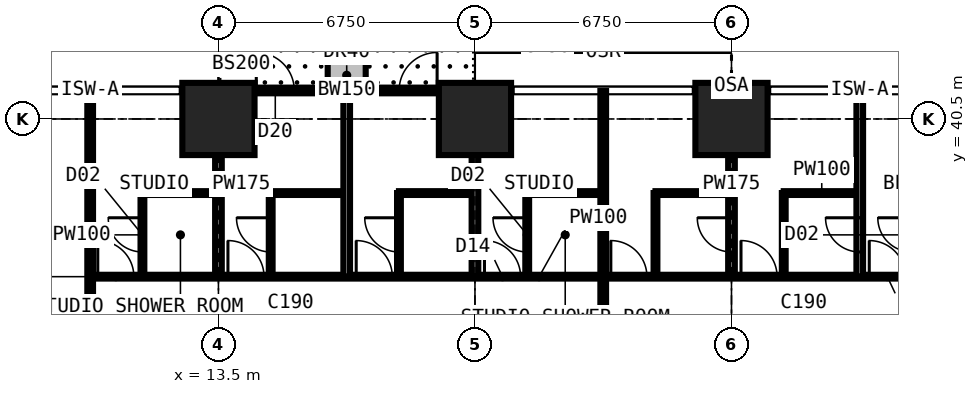
"""IFC4 building model, lengths in metres.
Left out: names, types, materials, properties, quantities, classifications, styles, units other than length and angle.
Written with IfcOpenShell. Run it as: python <this file> out.ifc"""

import sys

from ifc_helpers import new_model, si_unit, direction, frame, frame_2d, origin, origin_2d, place, context, subcontext, project, spatial, rectangle, extrude, element, fill, save


model = new_model("IFC4")
c1 = context("Model", 3, precision=1e-05, world=origin(), true_north=direction((0.0, 1.0)))
c2 = subcontext(c1, "Body", "Model", "MODEL_VIEW")
j1 = project(units=[si_unit("LENGTHUNIT", "METRE"), si_unit("PLANEANGLEUNIT", "RADIAN")], contexts=[c1])
p1 = place(None, origin())
s1 = spatial("IfcSite", under=j1, at=p1, CompositionType="ELEMENT")
p2 = place(p1, origin())
s2 = spatial("IfcBuilding", under=s1, at=p2, CompositionType="ELEMENT")
p3 = place(p2, frame((0.0, 0.0, 32.4)))
s3 = spatial("IfcBuildingStorey", under=s2, at=p3, CompositionType="ELEMENT", Elevation=32.4)
for number, where, z_axis, x_axis in (
    (1, (13.5, 40.5, 0.0), (0.0, 0.0, 1.0), (1.0, 0.0, 0.0)),
    (2, (20.25, 40.5, 0.0), (0.0, 0.0, 1.0), (1.0, 0.0, 0.0)),
    (3, (27.0, 40.5, 0.0), (0.0, 0.0, 1.0), (1.0, 0.0, 0.0)),
):
    element("IfcColumn", number, at=place(p3, frame(where, z_axis=z_axis, x_axis=x_axis)), inside=s3, PredefinedType="COLUMN", context=c2, shape_type="SweptSolid", body=[
        extrude(rectangle(XDim=1.9, YDim=1.9, at=origin_2d()), origin(), (0.0, 0.0, 1.0), 3.6),
    ])
p4 = place(p3, frame((13.5, 41.25, 0.0), z_axis=(0.0, 0.0, 1.0), x_axis=(1.0, 0.0, 0.0)))
e4 = element("IfcWall", 4, at=p4, inside=s3, PredefinedType="SOLIDWALL", context=c2, shape_type="SweptSolid", body=[
    extrude(rectangle(XDim=6.75, YDim=0.15, at=frame_2d((3.375, 0.0))), origin(), (0.0, 0.0, 1.0), 3.375),
])
p5 = place(p4, frame((0.996, 0.0, 0.0)))
e5 = element("IfcOpeningElement", 5, at=p5, cuts=e4, PredefinedType="OPENING", context=c2, shape_type="SweptSolid", body=[
    extrude(rectangle(XDim=1.0, YDim=2.2, at=frame_2d((0.5, 1.1))), frame((0.0, 0.085, 0.0), z_axis=(0.0, -1.0, 0.0), x_axis=(1.0, 0.0, 0.0)), (0.0, 0.0, 1.0), 0.17),
])
p6 = place(p4, frame((2.042, 0.0, 0.9)))
e6 = element("IfcOpeningElement", 6, at=p6, cuts=e4, PredefinedType="OPENING", context=c2, shape_type="SweptSolid", body=[
    extrude(rectangle(XDim=1.2, YDim=1.8, at=frame_2d((0.6, 0.9))), frame((0.0, 0.085, 0.0), z_axis=(0.0, -1.0, 0.0), x_axis=(1.0, 0.0, 0.0)), (0.0, 0.0, 1.0), 0.17),
])
p7 = place(p4, frame((4.754, 0.0, 0.0)))
e7 = element("IfcOpeningElement", 7, at=p7, cuts=e4, PredefinedType="OPENING", context=c2, shape_type="SweptSolid", body=[
    extrude(rectangle(XDim=1.0, YDim=2.2, at=frame_2d((0.5, 1.1))), frame((0.0, 0.085, 0.0), z_axis=(0.0, -1.0, 0.0), x_axis=(1.0, 0.0, 0.0)), (0.0, 0.0, 1.0), 0.17),
])
p8 = place(p4, frame((3.508, 0.0, 0.9)))
e8 = element("IfcOpeningElement", 8, at=p8, cuts=e4, PredefinedType="OPENING", context=c2, shape_type="SweptSolid", body=[
    extrude(rectangle(XDim=1.2, YDim=1.8, at=frame_2d((0.6, 0.9))), frame((0.0, 0.085, 0.0), z_axis=(0.0, -1.0, 0.0), x_axis=(1.0, 0.0, 0.0)), (0.0, 0.0, 1.0), 0.17),
])
p9 = place(p3, frame((16.875, 41.35, 0.0), z_axis=(0.0, 0.0, 1.0), x_axis=(0.0, 1.0, 0.0)))
e9 = element("IfcWall", 9, at=p9, inside=s3, PredefinedType="USERDEFINED", context=c2, shape_type="SweptSolid", body=[
    extrude(rectangle(XDim=2.2, YDim=1.0, at=frame_2d((1.1, 0.0))), origin(), (0.0, 0.0, 1.0), 0.9),
])
p10 = place(p3, frame((10.125, 30.375, 0.0), z_axis=(0.0, 0.0, 1.0), x_axis=(0.0, 1.0, 0.0)))
e10 = element("IfcWall", 10, at=p10, inside=s3, PredefinedType="PARTITIONING", context=c2, shape_type="SweptSolid", body=[
    extrude(rectangle(XDim=10.859, YDim=0.15, at=frame_2d((5.429, 0.0))), origin(), (0.0, 0.0, 1.0), 3.375),
])
p11 = place(p3, frame((10.125, 36.35, 0.0), z_axis=(0.0, 0.0, 1.0), x_axis=(1.0, 0.0, 0.0)))
e11 = element("IfcWall", 11, at=p11, inside=s3, PredefinedType="PARTITIONING", context=c2, shape_type="SweptSolid", body=[
    extrude(rectangle(XDim=23.625, YDim=0.1, at=frame_2d((11.812, 0.0))), origin(), (0.0, 0.0, 1.0), 3.375),
])
p12 = place(p11, frame((20.5, 0.0, 0.0)))
e12 = element("IfcOpeningElement", 12, at=p12, cuts=e11, PredefinedType="OPENING", context=c2, shape_type="SweptSolid", body=[
    extrude(rectangle(XDim=0.95, YDim=2.2, at=frame_2d((0.475, 1.1))), frame((0.0, 0.06, 0.0), z_axis=(0.0, -1.0, 0.0), x_axis=(1.0, 0.0, 0.0)), (0.0, 0.0, 1.0), 0.12),
])
p13 = place(p11, frame((17.125, 0.0, 0.0)))
e13 = element("IfcOpeningElement", 13, at=p13, cuts=e11, PredefinedType="OPENING", context=c2, shape_type="SweptSolid", body=[
    extrude(rectangle(XDim=0.95, YDim=2.2, at=frame_2d((0.475, 1.1))), frame((0.0, 0.06, 0.0), z_axis=(0.0, -1.0, 0.0), x_axis=(1.0, 0.0, 0.0)), (0.0, 0.0, 1.0), 0.12),
])
p14 = place(p11, frame((13.7, 0.0, 0.0)))
e14 = element("IfcOpeningElement", 14, at=p14, cuts=e11, PredefinedType="OPENING", context=c2, shape_type="SweptSolid", body=[
    extrude(rectangle(XDim=0.95, YDim=2.2, at=frame_2d((0.475, 1.1))), frame((0.0, 0.06, 0.0), z_axis=(0.0, -1.0, 0.0), x_axis=(1.0, 0.0, 0.0)), (0.0, 0.0, 1.0), 0.12),
])
p15 = place(p11, frame((0.2, 0.0, 0.0)))
e15 = element("IfcOpeningElement", 15, at=p15, cuts=e11, PredefinedType="OPENING", context=c2, shape_type="SweptSolid", body=[
    extrude(rectangle(XDim=0.95, YDim=2.2, at=frame_2d((0.475, 1.1))), frame((0.0, 0.06, 0.0), z_axis=(0.0, -1.0, 0.0), x_axis=(1.0, 0.0, 0.0)), (0.0, 0.0, 1.0), 0.12),
])
p16 = place(p11, frame((3.625, 0.0, 0.0)))
e16 = element("IfcOpeningElement", 16, at=p16, cuts=e11, PredefinedType="OPENING", context=c2, shape_type="SweptSolid", body=[
    extrude(rectangle(XDim=0.95, YDim=2.2, at=frame_2d((0.475, 1.1))), frame((0.0, 0.06, 0.0), z_axis=(0.0, -1.0, 0.0), x_axis=(1.0, 0.0, 0.0)), (0.0, 0.0, 1.0), 0.12),
])
p17 = place(p11, frame((7.0, 0.0, 0.0)))
e17 = element("IfcOpeningElement", 17, at=p17, cuts=e11, PredefinedType="OPENING", context=c2, shape_type="SweptSolid", body=[
    extrude(rectangle(XDim=0.95, YDim=2.2, at=frame_2d((0.475, 1.1))), frame((0.0, 0.06, 0.0), z_axis=(0.0, -1.0, 0.0), x_axis=(1.0, 0.0, 0.0)), (0.0, 0.0, 1.0), 0.12),
])
p18 = place(p11, frame((10.375, 0.0, 0.0)))
e18 = element("IfcOpeningElement", 18, at=p18, cuts=e11, PredefinedType="OPENING", context=c2, shape_type="SweptSolid", body=[
    extrude(rectangle(XDim=0.95, YDim=2.2, at=frame_2d((0.475, 1.1))), frame((0.0, 0.06, 0.0), z_axis=(0.0, -1.0, 0.0), x_axis=(1.0, 0.0, 0.0)), (0.0, 0.0, 1.0), 0.12),
])
p19 = place(p3, frame((11.5, 36.35, 0.0), z_axis=(0.0, 0.0, 1.0), x_axis=(0.0, 1.0, 0.0)))
e19 = element("IfcWall", 19, at=p19, inside=s3, PredefinedType="PARTITIONING", context=c2, shape_type="SweptSolid", body=[
    extrude(rectangle(XDim=2.2, YDim=0.1, at=frame_2d((1.1, 0.0))), origin(), (0.0, 0.0, 1.0), 3.375),
])
p20 = place(p19, frame((0.65, 0.0, 0.0)))
e20 = element("IfcOpeningElement", 20, at=p20, cuts=e19, PredefinedType="OPENING", context=c2, shape_type="SweptSolid", body=[
    extrude(rectangle(XDim=0.9, YDim=2.2, at=frame_2d((0.45, 1.1))), frame((0.0, 0.06, 0.0), z_axis=(0.0, -1.0, 0.0), x_axis=(1.0, 0.0, 0.0)), (0.0, 0.0, 1.0), 0.12),
])
p21 = place(p3, frame((11.5, 38.55, 0.0), z_axis=(0.0, 0.0, 1.0), x_axis=(1.0, 0.0, 0.0)))
e21 = element("IfcWall", 21, at=p21, inside=s3, PredefinedType="PARTITIONING", context=c2, shape_type="SweptSolid", body=[
    extrude(rectangle(XDim=2.0, YDim=0.1, at=frame_2d((1.0, 0.0))), origin(), (0.0, 0.0, 1.0), 3.375),
])
p22 = place(p3, frame((13.5, 36.35, 0.0), z_axis=(0.0, 0.0, 1.0), x_axis=(0.0, 1.0, 0.0)))
e22 = element("IfcWall", 22, at=p22, inside=s3, PredefinedType="PARTITIONING", context=c2, shape_type="SweptSolid", body=[
    extrude(rectangle(XDim=4.884, YDim=0.175, at=frame_2d((2.442, 0.0))), origin(), (0.0, 0.0, 1.0), 2.877),
])
p23 = place(p3, frame((14.875, 36.35, 0.0), z_axis=(0.0, 0.0, 1.0), x_axis=(0.0, 1.0, 0.0)))
e23 = element("IfcWall", 23, at=p23, inside=s3, PredefinedType="PARTITIONING", context=c2, shape_type="SweptSolid", body=[
    extrude(rectangle(XDim=2.2, YDim=0.1, at=frame_2d((1.1, 0.0))), origin(), (0.0, 0.0, 1.0), 3.375),
])
p24 = place(p23, frame((0.65, 0.0, 0.0)))
e24 = element("IfcOpeningElement", 24, at=p24, cuts=e23, PredefinedType="OPENING", context=c2, shape_type="SweptSolid", body=[
    extrude(rectangle(XDim=0.9, YDim=2.2, at=frame_2d((0.45, 1.1))), frame((0.0, 0.06, 0.0), z_axis=(0.0, -1.0, 0.0), x_axis=(1.0, 0.0, 0.0)), (0.0, 0.0, 1.0), 0.12),
])
p25 = place(p3, frame((14.875, 38.55, 0.0), z_axis=(0.0, 0.0, 1.0), x_axis=(1.0, 0.0, 0.0)))
e25 = element("IfcWall", 25, at=p25, inside=s3, PredefinedType="PARTITIONING", context=c2, shape_type="SweptSolid", body=[
    extrude(rectangle(XDim=2.0, YDim=0.1, at=frame_2d((1.0, 0.0))), origin(), (0.0, 0.0, 1.0), 3.375),
])
p26 = place(p3, frame((16.875, 36.35, 0.0), z_axis=(0.0, 0.0, 1.0), x_axis=(0.0, 1.0, 0.0)))
e26 = element("IfcWall", 26, at=p26, inside=s3, PredefinedType="PARTITIONING", context=c2, shape_type="SweptSolid", body=[
    extrude(rectangle(XDim=4.884, YDim=0.175, at=frame_2d((2.442, 0.0))), origin(), (0.0, 0.0, 1.0), 3.375),
])
p27 = place(p3, frame((18.25, 36.35, 0.0), z_axis=(0.0, 0.0, 1.0), x_axis=(0.0, 1.0, 0.0)))
e27 = element("IfcWall", 27, at=p27, inside=s3, PredefinedType="PARTITIONING", context=c2, shape_type="SweptSolid", body=[
    extrude(rectangle(XDim=2.2, YDim=0.1, at=frame_2d((1.1, 0.0))), origin(), (0.0, 0.0, 1.0), 3.375),
])
p28 = place(p27, frame((0.65, 0.0, 0.0)))
e28 = element("IfcOpeningElement", 28, at=p28, cuts=e27, PredefinedType="OPENING", context=c2, shape_type="SweptSolid", body=[
    extrude(rectangle(XDim=0.9, YDim=2.2, at=frame_2d((0.45, 1.1))), frame((0.0, 0.06, 0.0), z_axis=(0.0, -1.0, 0.0), x_axis=(1.0, 0.0, 0.0)), (0.0, 0.0, 1.0), 0.12),
])
p29 = place(p3, frame((18.25, 38.55, 0.0), z_axis=(0.0, 0.0, 1.0), x_axis=(1.0, 0.0, 0.0)))
e29 = element("IfcWall", 29, at=p29, inside=s3, PredefinedType="PARTITIONING", context=c2, shape_type="SweptSolid", body=[
    extrude(rectangle(XDim=2.0, YDim=0.1, at=frame_2d((1.0, 0.0))), origin(), (0.0, 0.0, 1.0), 3.375),
])
p30 = place(p3, frame((20.25, 36.35, 0.0), z_axis=(0.0, 0.0, 1.0), x_axis=(0.0, 1.0, 0.0)))
e30 = element("IfcWall", 30, at=p30, inside=s3, PredefinedType="PARTITIONING", context=c2, shape_type="SweptSolid", body=[
    extrude(rectangle(XDim=4.884, YDim=0.175, at=frame_2d((2.442, 0.0))), origin(), (0.0, 0.0, 1.0), 2.61),
])
p31 = place(p3, frame((21.625, 36.35, 0.0), z_axis=(0.0, 0.0, 1.0), x_axis=(0.0, 1.0, 0.0)))
e31 = element("IfcWall", 31, at=p31, inside=s3, PredefinedType="PARTITIONING", context=c2, shape_type="SweptSolid", body=[
    extrude(rectangle(XDim=2.2, YDim=0.1, at=frame_2d((1.1, 0.0))), origin(), (0.0, 0.0, 1.0), 3.375),
])
p32 = place(p31, frame((0.65, 0.0, 0.0)))
e32 = element("IfcOpeningElement", 32, at=p32, cuts=e31, PredefinedType="OPENING", context=c2, shape_type="SweptSolid", body=[
    extrude(rectangle(XDim=0.9, YDim=2.2, at=frame_2d((0.45, 1.1))), frame((0.0, 0.06, 0.0), z_axis=(0.0, -1.0, 0.0), x_axis=(1.0, 0.0, 0.0)), (0.0, 0.0, 1.0), 0.12),
])
p33 = place(p3, frame((21.625, 38.55, 0.0), z_axis=(0.0, 0.0, 1.0), x_axis=(1.0, 0.0, 0.0)))
e33 = element("IfcWall", 33, at=p33, inside=s3, PredefinedType="PARTITIONING", context=c2, shape_type="SweptSolid", body=[
    extrude(rectangle(XDim=2.0, YDim=0.1, at=frame_2d((1.0, 0.0))), origin(), (0.0, 0.0, 1.0), 3.375),
])
p34 = place(p3, frame((23.625, 29.2, 0.0), z_axis=(0.0, 0.0, 1.0), x_axis=(0.0, 1.0, 0.0)))
e34 = element("IfcWall", 34, at=p34, inside=s3, PredefinedType="PARTITIONING", context=c2, shape_type="SweptSolid", body=[
    extrude(rectangle(XDim=12.034, YDim=0.15, at=frame_2d((6.017, 0.0))), origin(), (0.0, 0.0, 1.0), 3.375),
])
p35 = place(p3, frame((25.0, 36.35, 0.0), z_axis=(0.0, 0.0, 1.0), x_axis=(0.0, 1.0, 0.0)))
e35 = element("IfcWall", 35, at=p35, inside=s3, PredefinedType="PARTITIONING", context=c2, shape_type="SweptSolid", body=[
    extrude(rectangle(XDim=2.2, YDim=0.1, at=frame_2d((1.1, 0.0))), origin(), (0.0, 0.0, 1.0), 3.375),
])
p36 = place(p3, frame((25.0, 38.55, 0.0), z_axis=(0.0, 0.0, 1.0), x_axis=(1.0, 0.0, 0.0)))
e36 = element("IfcWall", 36, at=p36, inside=s3, PredefinedType="PARTITIONING", context=c2, shape_type="SweptSolid", body=[
    extrude(rectangle(XDim=2.0, YDim=0.1, at=frame_2d((1.0, 0.0))), origin(), (0.0, 0.0, 1.0), 3.375),
])
p37 = place(p3, frame((27.0, 36.35, 0.0), z_axis=(0.0, 0.0, 1.0), x_axis=(0.0, 1.0, 0.0)))
e37 = element("IfcWall", 37, at=p37, inside=s3, PredefinedType="PARTITIONING", context=c2, shape_type="SweptSolid", body=[
    extrude(rectangle(XDim=4.884, YDim=0.175, at=frame_2d((2.442, 0.0))), origin(), (0.0, 0.0, 1.0), 2.61),
])
p38 = place(p37, frame((0.65, 0.0, 0.0)))
e38 = element("IfcOpeningElement", 38, at=p38, cuts=e37, PredefinedType="OPENING", context=c2, shape_type="SweptSolid", body=[
    extrude(rectangle(XDim=0.9, YDim=2.2, at=frame_2d((0.45, 1.1))), frame((0.0, 0.097, 0.0), z_axis=(0.0, -1.0, 0.0), x_axis=(1.0, 0.0, 0.0)), (0.0, 0.0, 1.0), 0.195),
])
p39 = place(p3, frame((28.375, 36.35, 0.0), z_axis=(0.0, 0.0, 1.0), x_axis=(0.0, 1.0, 0.0)))
e39 = element("IfcWall", 39, at=p39, inside=s3, PredefinedType="PARTITIONING", context=c2, shape_type="SweptSolid", body=[
    extrude(rectangle(XDim=2.2, YDim=0.1, at=frame_2d((1.1, 0.0))), origin(), (0.0, 0.0, 1.0), 3.375),
])
p40 = place(p3, frame((28.375, 38.55, 0.0), z_axis=(0.0, 0.0, 1.0), x_axis=(1.0, 0.0, 0.0)))
e40 = element("IfcWall", 40, at=p40, inside=s3, PredefinedType="PARTITIONING", context=c2, shape_type="SweptSolid", body=[
    extrude(rectangle(XDim=2.0, YDim=0.1, at=frame_2d((1.0, 0.0))), origin(), (0.0, 0.0, 1.0), 3.375),
])
p41 = place(p3, frame((30.375, 36.35, 0.0), z_axis=(0.0, 0.0, 1.0), x_axis=(0.0, 1.0, 0.0)))
e41 = element("IfcWall", 41, at=p41, inside=s3, PredefinedType="PARTITIONING", context=c2, shape_type="SweptSolid", body=[
    extrude(rectangle(XDim=4.884, YDim=0.175, at=frame_2d((2.442, 0.0))), origin(), (0.0, 0.0, 1.0), 3.375),
])
p42 = place(p41, frame((0.65, 0.0, 0.0)))
e42 = element("IfcOpeningElement", 42, at=p42, cuts=e41, PredefinedType="OPENING", context=c2, shape_type="SweptSolid", body=[
    extrude(rectangle(XDim=0.9, YDim=2.2, at=frame_2d((0.45, 1.1))), frame((0.0, 0.097, 0.0), z_axis=(0.0, -1.0, 0.0), x_axis=(1.0, 0.0, 0.0)), (0.0, 0.0, 1.0), 0.195),
])
p43 = place(p5, origin())
e43 = element("IfcDoor", 43, at=p43, inside=s3, OperationType="SINGLE_SWING_LEFT", PredefinedType="DOOR", context=c2, shape_type="SweptSolid", body=[
    extrude(rectangle(XDim=1.0, YDim=2.2, at=frame_2d((0.5, 1.1))), frame((0.0, 0.025, 0.0), z_axis=(0.0, -1.0, 0.0), x_axis=(1.0, 0.0, 0.0)), (0.0, 0.0, 1.0), 0.05),
])
fill(e5, e43)
p44 = place(p6, origin())
e44 = element("IfcWindow", 44, at=p44, inside=s3, PartitioningType="SINGLE_PANEL", PredefinedType="WINDOW", context=c2, shape_type="SweptSolid", body=[
    extrude(rectangle(XDim=1.2, YDim=1.8, at=frame_2d((0.6, 0.9))), frame((0.0, 0.03, 0.0), z_axis=(0.0, -1.0, 0.0), x_axis=(1.0, 0.0, 0.0)), (0.0, 0.0, 1.0), 0.06),
])
fill(e6, e44)
p45 = place(p7, origin())
e45 = element("IfcDoor", 45, at=p45, inside=s3, OperationType="SINGLE_SWING_RIGHT", PredefinedType="DOOR", context=c2, shape_type="SweptSolid", body=[
    extrude(rectangle(XDim=1.0, YDim=2.2, at=frame_2d((0.5, 1.1))), frame((0.0, 0.025, 0.0), z_axis=(0.0, -1.0, 0.0), x_axis=(1.0, 0.0, 0.0)), (0.0, 0.0, 1.0), 0.05),
])
fill(e7, e45)
p46 = place(p8, origin())
e46 = element("IfcWindow", 46, at=p46, inside=s3, PartitioningType="SINGLE_PANEL", PredefinedType="WINDOW", context=c2, shape_type="SweptSolid", body=[
    extrude(rectangle(XDim=1.2, YDim=1.8, at=frame_2d((0.6, 0.9))), frame((0.0, 0.03, 0.0), z_axis=(0.0, -1.0, 0.0), x_axis=(1.0, 0.0, 0.0)), (0.0, 0.0, 1.0), 0.06),
])
fill(e8, e46)
p47 = place(p12, origin())
e47 = element("IfcDoor", 47, at=p47, inside=s3, OperationType="SINGLE_SWING_LEFT", PredefinedType="DOOR", context=c2, shape_type="SweptSolid", body=[
    extrude(rectangle(XDim=0.95, YDim=2.2, at=frame_2d((0.475, 1.1))), frame((0.0, 0.025, 0.0), z_axis=(0.0, -1.0, 0.0), x_axis=(1.0, 0.0, 0.0)), (0.0, 0.0, 1.0), 0.05),
])
fill(e12, e47)
p48 = place(p13, origin())
e48 = element("IfcDoor", 48, at=p48, inside=s3, OperationType="SINGLE_SWING_LEFT", PredefinedType="DOOR", context=c2, shape_type="SweptSolid", body=[
    extrude(rectangle(XDim=0.95, YDim=2.2, at=frame_2d((0.475, 1.1))), frame((0.0, 0.025, 0.0), z_axis=(0.0, -1.0, 0.0), x_axis=(1.0, 0.0, 0.0)), (0.0, 0.0, 1.0), 0.05),
])
fill(e13, e48)
p49 = place(p42, origin())
e49 = element("IfcDoor", 49, at=p49, inside=s3, OperationType="SINGLE_SWING_RIGHT", PredefinedType="DOOR", context=c2, shape_type="SweptSolid", body=[
    extrude(rectangle(XDim=0.9, YDim=2.2, at=frame_2d((0.45, 1.1))), frame((0.0, 0.025, 0.0), z_axis=(0.0, -1.0, 0.0), x_axis=(1.0, 0.0, 0.0)), (0.0, 0.0, 1.0), 0.05),
])
fill(e42, e49)
p50 = place(p14, origin())
e50 = element("IfcDoor", 50, at=p50, inside=s3, OperationType="SINGLE_SWING_LEFT", PredefinedType="DOOR", context=c2, shape_type="SweptSolid", body=[
    extrude(rectangle(XDim=0.95, YDim=2.2, at=frame_2d((0.475, 1.1))), frame((0.0, 0.025, 0.0), z_axis=(0.0, -1.0, 0.0), x_axis=(1.0, 0.0, 0.0)), (0.0, 0.0, 1.0), 0.05),
])
fill(e14, e50)
p51 = place(p38, origin())
e51 = element("IfcDoor", 51, at=p51, inside=s3, OperationType="SINGLE_SWING_RIGHT", PredefinedType="DOOR", context=c2, shape_type="SweptSolid", body=[
    extrude(rectangle(XDim=0.9, YDim=2.2, at=frame_2d((0.45, 1.1))), frame((0.0, 0.025, 0.0), z_axis=(0.0, -1.0, 0.0), x_axis=(1.0, 0.0, 0.0)), (0.0, 0.0, 1.0), 0.05),
])
fill(e38, e51)
p52 = place(p15, origin())
e52 = element("IfcDoor", 52, at=p52, inside=s3, OperationType="SINGLE_SWING_LEFT", PredefinedType="DOOR", context=c2, shape_type="SweptSolid", body=[
    extrude(rectangle(XDim=0.95, YDim=2.2, at=frame_2d((0.475, 1.1))), frame((0.0, 0.025, 0.0), z_axis=(0.0, -1.0, 0.0), x_axis=(1.0, 0.0, 0.0)), (0.0, 0.0, 1.0), 0.05),
])
fill(e15, e52)
p53 = place(p20, origin())
e53 = element("IfcDoor", 53, at=p53, inside=s3, OperationType="SINGLE_SWING_RIGHT", PredefinedType="DOOR", context=c2, shape_type="SweptSolid", body=[
    extrude(rectangle(XDim=0.9, YDim=2.2, at=frame_2d((0.45, 1.1))), frame((0.0, 0.025, 0.0), z_axis=(0.0, -1.0, 0.0), x_axis=(1.0, 0.0, 0.0)), (0.0, 0.0, 1.0), 0.05),
])
fill(e20, e53)
p54 = place(p16, origin())
e54 = element("IfcDoor", 54, at=p54, inside=s3, OperationType="SINGLE_SWING_LEFT", PredefinedType="DOOR", context=c2, shape_type="SweptSolid", body=[
    extrude(rectangle(XDim=0.95, YDim=2.2, at=frame_2d((0.475, 1.1))), frame((0.0, 0.025, 0.0), z_axis=(0.0, -1.0, 0.0), x_axis=(1.0, 0.0, 0.0)), (0.0, 0.0, 1.0), 0.05),
])
fill(e16, e54)
p55 = place(p24, origin())
e55 = element("IfcDoor", 55, at=p55, inside=s3, OperationType="SINGLE_SWING_RIGHT", PredefinedType="DOOR", context=c2, shape_type="SweptSolid", body=[
    extrude(rectangle(XDim=0.9, YDim=2.2, at=frame_2d((0.45, 1.1))), frame((0.0, 0.025, 0.0), z_axis=(0.0, -1.0, 0.0), x_axis=(1.0, 0.0, 0.0)), (0.0, 0.0, 1.0), 0.05),
])
fill(e24, e55)
p56 = place(p17, origin())
e56 = element("IfcDoor", 56, at=p56, inside=s3, OperationType="SINGLE_SWING_LEFT", PredefinedType="DOOR", context=c2, shape_type="SweptSolid", body=[
    extrude(rectangle(XDim=0.95, YDim=2.2, at=frame_2d((0.475, 1.1))), frame((0.0, 0.025, 0.0), z_axis=(0.0, -1.0, 0.0), x_axis=(1.0, 0.0, 0.0)), (0.0, 0.0, 1.0), 0.05),
])
fill(e17, e56)
p57 = place(p28, origin())
e57 = element("IfcDoor", 57, at=p57, inside=s3, OperationType="SINGLE_SWING_RIGHT", PredefinedType="DOOR", context=c2, shape_type="SweptSolid", body=[
    extrude(rectangle(XDim=0.9, YDim=2.2, at=frame_2d((0.45, 1.1))), frame((0.0, 0.025, 0.0), z_axis=(0.0, -1.0, 0.0), x_axis=(1.0, 0.0, 0.0)), (0.0, 0.0, 1.0), 0.05),
])
fill(e28, e57)
p58 = place(p18, origin())
e58 = element("IfcDoor", 58, at=p58, inside=s3, OperationType="SINGLE_SWING_LEFT", PredefinedType="DOOR", context=c2, shape_type="SweptSolid", body=[
    extrude(rectangle(XDim=0.95, YDim=2.2, at=frame_2d((0.475, 1.1))), frame((0.0, 0.025, 0.0), z_axis=(0.0, -1.0, 0.0), x_axis=(1.0, 0.0, 0.0)), (0.0, 0.0, 1.0), 0.05),
])
fill(e18, e58)
p59 = place(p32, origin())
e59 = element("IfcDoor", 59, at=p59, inside=s3, OperationType="SINGLE_SWING_RIGHT", PredefinedType="DOOR", context=c2, shape_type="SweptSolid", body=[
    extrude(rectangle(XDim=0.9, YDim=2.2, at=frame_2d((0.45, 1.1))), frame((0.0, 0.025, 0.0), z_axis=(0.0, -1.0, 0.0), x_axis=(1.0, 0.0, 0.0)), (0.0, 0.0, 1.0), 0.05),
])
fill(e32, e59)
save(model, sys.argv[1])
